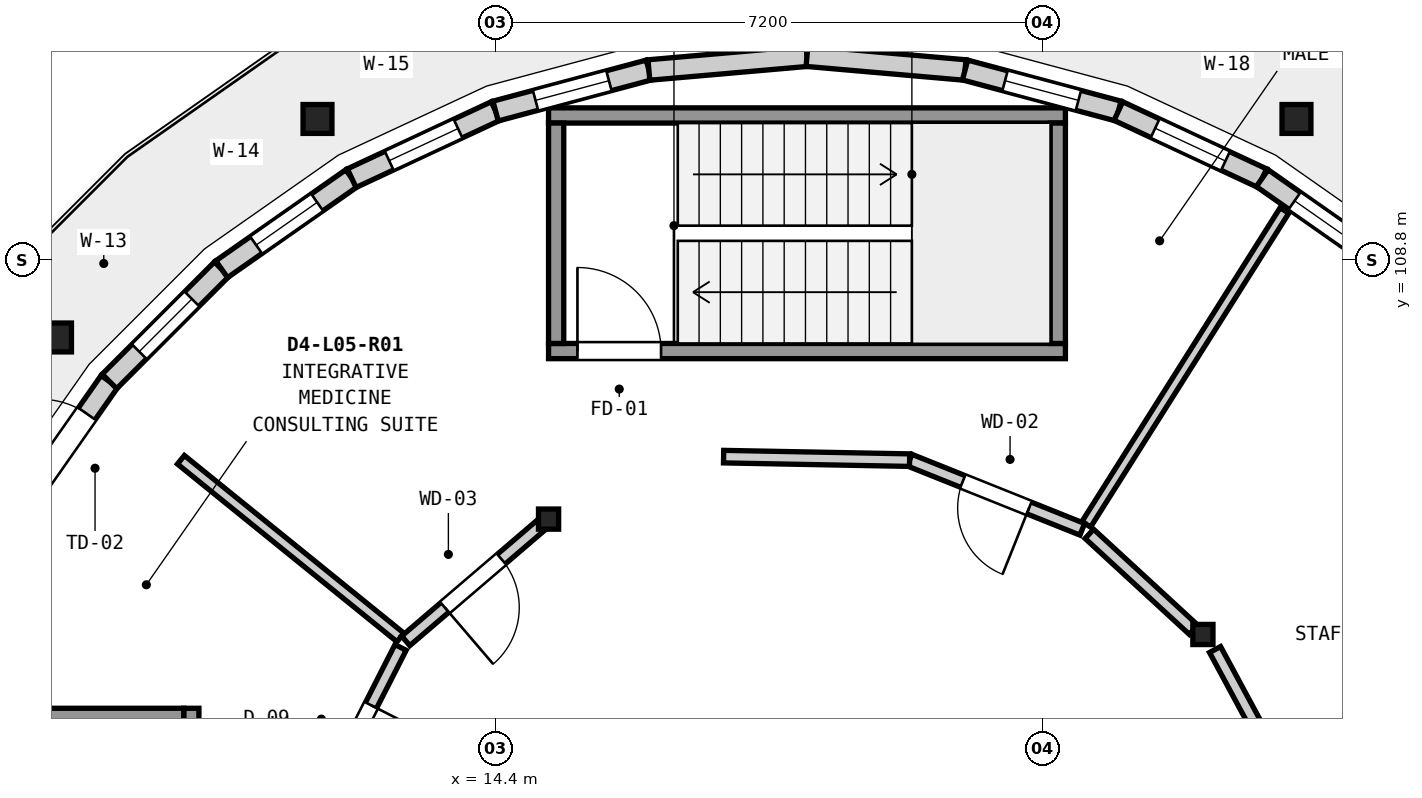
"""IFC4 building model, lengths in metres.
Left out: names, types, materials, properties, quantities, classifications, styles, units other than length and angle.
Written with IfcOpenShell. Run it as: python <this file> out.ifc"""

import sys

from ifc_helpers import new_model, si_unit, direction, frame, frame_2d, origin, origin_2d, place, context, subcontext, project, spatial, rectangle, circle, extrude, element, fill, save


model = new_model("IFC4")
c1 = context("Model", 3, precision=1e-05, world=origin(), true_north=direction((0.0, 1.0)))
c2 = subcontext(c1, "Body", "Model", "MODEL_VIEW")
j1 = project(units=[si_unit("LENGTHUNIT", "METRE"), si_unit("PLANEANGLEUNIT", "RADIAN")], contexts=[c1])
p1 = place(None, origin())
s1 = spatial("IfcSite", under=j1, at=p1, CompositionType="ELEMENT")
p2 = place(p1, origin())
s2 = spatial("IfcBuilding", under=s1, at=p2, CompositionType="ELEMENT")
p3 = place(p2, frame((0.0, 0.0, 21.35)))
s3 = spatial("IfcBuildingStorey", under=s2, at=p3, CompositionType="ELEMENT", Elevation=21.35)
for number, where, z_axis, x_axis in (
    (1, (24.94, 110.654, 0.0), (0.0, 0.0, 1.0), (1.0, 0.0, 0.0)),
    (2, (12.06, 110.654, 0.0), (0.0, 0.0, 1.0), (1.0, 0.0, 0.0)),
    (3, (8.633, 107.779, 0.0), (0.0, 0.0, 1.0), (1.0, 0.0, 0.0)),
):
    element("IfcColumn", number, at=place(p3, frame(where, z_axis=z_axis, x_axis=x_axis)), inside=s3, PredefinedType="PILASTER", context=c2, shape_type="SweptSolid", body=[
        extrude(circle(Radius=0.19, at=origin_2d()), origin(), (0.0, 0.0, 1.0), 4.2),
    ])
for number, where, z_axis, x_axis in (
    (4, (23.709, 103.871, 0.0), (0.0, 0.0, 1.0), (1.0, 0.0, 0.0)),
    (5, (15.1, 105.389, 0.0), (0.0, 0.0, 1.0), (1.0, 0.0, 0.0)),
):
    element("IfcColumn", number, at=place(p3, frame(where, z_axis=z_axis, x_axis=x_axis)), inside=s3, PredefinedType="COLUMN", context=c2, shape_type="SweptSolid", body=[
        extrude(rectangle(XDim=0.265, YDim=0.265, at=origin_2d()), origin(), (0.0, 0.0, 1.0), 4.2),
    ])
p4 = place(p3, frame((8.125, 105.49, 0.0), z_axis=(0.0, 0.0, 1.0), x_axis=(0.573572167388, 0.819155033433, 0.0)))
e6 = element("IfcWall", 6, at=p4, inside=s3, PredefinedType="ELEMENTEDWALL", context=c2, shape_type="SweptSolid", body=[
    extrude(rectangle(XDim=2.089, YDim=0.27, at=frame_2d((1.044, 0.0))), origin(), (0.0, 0.0, 1.0), 3.314),
])
p5 = place(p4, frame((0.519, 0.0, 0.0)))
e7 = element("IfcOpeningElement", 7, at=p5, cuts=e6, PredefinedType="OPENING", context=c2, shape_type="SweptSolid", body=[
    extrude(rectangle(XDim=1.05, YDim=2.15, at=frame_2d((0.525, 1.075))), frame((0.0, 0.145, 0.0), z_axis=(0.0, -1.0, 0.0), x_axis=(1.0, 0.0, 0.0)), (0.0, 0.0, 1.0), 0.29),
])
p6 = place(p3, frame((9.323, 107.201, 0.0), z_axis=(0.0, 0.0, 1.0), x_axis=(0.707106781187, 0.707106781187, 0.0)))
e8 = element("IfcWall", 8, at=p6, inside=s3, PredefinedType="ELEMENTEDWALL", context=c2, shape_type="SweptSolid", body=[
    extrude(rectangle(XDim=2.087, YDim=0.27, at=frame_2d((1.044, 0.0))), origin(), (0.0, 0.0, 1.0), 3.314),
])
p7 = place(p6, frame((0.554, 0.0, 0.85)))
e9 = element("IfcOpeningElement", 9, at=p7, cuts=e8, PredefinedType="OPENING", context=c2, shape_type="SweptSolid", body=[
    extrude(rectangle(XDim=0.98, YDim=1.5, at=frame_2d((0.49, 0.75))), frame((0.0, 0.145, 0.0), z_axis=(0.0, -1.0, 0.0), x_axis=(1.0, 0.0, 0.0)), (0.0, 0.0, 1.0), 0.29),
])
p8 = place(p3, frame((10.799, 108.677, 0.0), z_axis=(0.0, 0.0, 1.0), x_axis=(0.819155033433, 0.573572167388, 0.0)))
e10 = element("IfcWall", 10, at=p8, inside=s3, PredefinedType="ELEMENTEDWALL", context=c2, shape_type="SweptSolid", body=[
    extrude(rectangle(XDim=2.089, YDim=0.27, at=frame_2d((1.044, 0.0))), origin(), (0.0, 0.0, 1.0), 3.314),
])
p9 = place(p8, frame((0.554, 0.0, 0.85)))
e11 = element("IfcOpeningElement", 11, at=p9, cuts=e10, PredefinedType="OPENING", context=c2, shape_type="SweptSolid", body=[
    extrude(rectangle(XDim=0.98, YDim=1.75, at=frame_2d((0.49, 0.875))), frame((0.0, 0.145, 0.0), z_axis=(0.0, -1.0, 0.0), x_axis=(1.0, 0.0, 0.0)), (0.0, 0.0, 1.0), 0.29),
])
p10 = place(p3, frame((12.51, 109.875, 0.0), z_axis=(0.0, 0.0, 1.0), x_axis=(0.906251803004, 0.422738299131, 0.0)))
e12 = element("IfcWall", 12, at=p10, inside=s3, PredefinedType="ELEMENTEDWALL", context=c2, shape_type="SweptSolid", body=[
    extrude(rectangle(XDim=2.089, YDim=0.27, at=frame_2d((1.044, 0.0))), origin(), (0.0, 0.0, 1.0), 3.314),
])
p11 = place(p10, frame((0.544, 0.0, 0.85)))
e13 = element("IfcOpeningElement", 13, at=p11, cuts=e12, PredefinedType="OPENING", context=c2, shape_type="SweptSolid", body=[
    extrude(rectangle(XDim=1.0, YDim=1.45, at=frame_2d((0.5, 0.725))), frame((0.0, 0.145, 0.0), z_axis=(0.0, -1.0, 0.0), x_axis=(1.0, 0.0, 0.0)), (0.0, 0.0, 1.0), 0.29),
])
p12 = place(p3, frame((14.403, 110.758, 0.0), z_axis=(0.0, 0.0, 1.0), x_axis=(0.965970487849, 0.258652308331, 0.0)))
e14 = element("IfcWall", 14, at=p12, inside=s3, PredefinedType="ELEMENTEDWALL", context=c2, shape_type="SweptSolid", body=[
    extrude(rectangle(XDim=2.088, YDim=0.27, at=frame_2d((1.044, 0.0))), origin(), (0.0, 0.0, 1.0), 3.314),
])
p13 = place(p12, frame((0.544, 0.0, 0.85)))
e15 = element("IfcOpeningElement", 15, at=p13, cuts=e14, PredefinedType="OPENING", context=c2, shape_type="SweptSolid", body=[
    extrude(rectangle(XDim=1.0, YDim=1.75, at=frame_2d((0.5, 0.875))), frame((0.0, 0.145, 0.0), z_axis=(0.0, -1.0, 0.0), x_axis=(1.0, 0.0, 0.0)), (0.0, 0.0, 1.0), 0.29),
])
for number, where, z_axis, x_axis in (
    (16, (16.42, 111.298, 0.0), (0.0, 0.0, 1.0), (0.996, 0.087, 0.0)),
    (17, (18.5, 111.48, 0.0), (0.0, 0.0, 1.0), (0.996, -0.087, 0.0)),
):
    element("IfcWall", number, at=place(p3, frame(where, z_axis=z_axis, x_axis=x_axis)), inside=s3, PredefinedType="ELEMENTEDWALL", context=c2, shape_type="SweptSolid", body=[
        extrude(rectangle(XDim=2.088, YDim=0.27, at=frame_2d((1.044, 0.0))), origin(), (0.0, 0.0, 1.0), 3.314),
    ])
p14 = place(p3, frame((20.58, 111.298, 0.0), z_axis=(0.0, 0.0, 1.0), x_axis=(0.965970487849, -0.258652308331, 0.0)))
e18 = element("IfcWall", 18, at=p14, inside=s3, PredefinedType="ELEMENTEDWALL", context=c2, shape_type="SweptSolid", body=[
    extrude(rectangle(XDim=2.088, YDim=0.27, at=frame_2d((1.044, 0.0))), origin(), (0.0, 0.0, 1.0), 3.314),
])
p15 = place(p14, frame((0.544, 0.0, 0.85)))
e19 = element("IfcOpeningElement", 19, at=p15, cuts=e18, PredefinedType="OPENING", context=c2, shape_type="SweptSolid", body=[
    extrude(rectangle(XDim=1.0, YDim=2.0, at=frame_2d((0.5, 1.0))), frame((0.0, 0.145, 0.0), z_axis=(0.0, -1.0, 0.0), x_axis=(1.0, 0.0, 0.0)), (0.0, 0.0, 1.0), 0.29),
])
p16 = place(p3, frame((22.597, 110.758, 0.0), z_axis=(0.0, 0.0, 1.0), x_axis=(0.906251803004, -0.422738299131, 0.0)))
e20 = element("IfcWall", 20, at=p16, inside=s3, PredefinedType="ELEMENTEDWALL", context=c2, shape_type="SweptSolid", body=[
    extrude(rectangle(XDim=2.089, YDim=0.27, at=frame_2d((1.044, 0.0))), origin(), (0.0, 0.0, 1.0), 3.314),
])
p17 = place(p16, frame((0.534, 0.0, 0.85)))
e21 = element("IfcOpeningElement", 21, at=p17, cuts=e20, PredefinedType="OPENING", context=c2, shape_type="SweptSolid", body=[
    extrude(rectangle(XDim=1.02, YDim=1.6, at=frame_2d((0.51, 0.8))), frame((0.0, 0.145, 0.0), z_axis=(0.0, -1.0, 0.0), x_axis=(1.0, 0.0, 0.0)), (0.0, 0.0, 1.0), 0.29),
])
p18 = place(p3, frame((24.49, 109.875, 0.0), z_axis=(0.0, 0.0, 1.0), x_axis=(0.819155033433, -0.573572167388, 0.0)))
e22 = element("IfcWall", 22, at=p18, inside=s3, PredefinedType="ELEMENTEDWALL", context=c2, shape_type="SweptSolid", body=[
    extrude(rectangle(XDim=2.089, YDim=0.27, at=frame_2d((1.044, 0.0))), origin(), (0.0, 0.0, 1.0), 3.314),
])
p19 = place(p18, frame((0.519, 0.0, 0.85)))
e23 = element("IfcOpeningElement", 23, at=p19, cuts=e22, PredefinedType="OPENING", context=c2, shape_type="SweptSolid", body=[
    extrude(rectangle(XDim=1.05, YDim=1.35, at=frame_2d((0.525, 0.675))), frame((0.0, 0.145, 0.0), z_axis=(0.0, -1.0, 0.0), x_axis=(1.0, 0.0, 0.0)), (0.0, 0.0, 1.0), 0.29),
])
p20 = place(p3, frame((15.1, 107.6, 0.0), z_axis=(0.0, 0.0, 1.0), x_axis=(1.0, 0.0, 0.0)))
e24 = element("IfcWall", 24, at=p20, inside=s3, PredefinedType="SHEAR", context=c2, shape_type="SweptSolid", body=[
    extrude(rectangle(XDim=6.8, YDim=0.2, at=frame_2d((3.4, 0.0))), origin(), (0.0, 0.0, 1.0), 3.96),
])
p21 = place(p20, frame((0.38, 0.0, 0.0)))
e25 = element("IfcOpeningElement", 25, at=p21, cuts=e24, PredefinedType="OPENING", context=c2, shape_type="SweptSolid", body=[
    extrude(rectangle(XDim=1.1, YDim=2.15, at=frame_2d((0.55, 1.075))), frame((0.0, 0.11, 0.0), z_axis=(0.0, -1.0, 0.0), x_axis=(1.0, 0.0, 0.0)), (0.0, 0.0, 1.0), 0.22),
])
p22 = place(p3, frame((15.1, 110.7, 0.0), z_axis=(0.0, 0.0, 1.0), x_axis=(1.0, 0.0, 0.0)))
e26 = element("IfcWall", 26, at=p22, inside=s3, PredefinedType="SHEAR", context=c2, shape_type="SweptSolid", body=[
    extrude(rectangle(XDim=6.8, YDim=0.2, at=frame_2d((3.4, 0.0))), origin(), (0.0, 0.0, 1.0), 3.96),
])
for number, where, z_axis, x_axis in (
    (27, (15.2, 107.7, 0.0), (0.0, 0.0, 1.0), (0.0, 1.0, 0.0)),
    (28, (21.8, 107.7, 0.0), (0.0, 0.0, 1.0), (0.0, 1.0, 0.0)),
):
    element("IfcWall", number, at=place(p3, frame(where, z_axis=z_axis, x_axis=x_axis)), inside=s3, PredefinedType="SHEAR", context=c2, shape_type="SweptSolid", body=[
        extrude(rectangle(XDim=2.9, YDim=0.2, at=frame_2d((1.45, 0.0))), origin(), (0.0, 0.0, 1.0), 3.96),
    ])
p23 = place(p3, frame((10.4, 96.1, 0.0), z_axis=(0.0, 0.0, 1.0), x_axis=(0.0, 1.0, 0.0)))
e29 = element("IfcWall", 29, at=p23, inside=s3, PredefinedType="SHEAR", context=c2, shape_type="SweptSolid", body=[
    extrude(rectangle(XDim=6.8, YDim=0.2, at=frame_2d((3.4, 0.0))), origin(), (0.0, 0.0, 1.0), 3.96),
])
p24 = place(p23, frame((0.38, 0.0, 0.0)))
e30 = element("IfcOpeningElement", 30, at=p24, cuts=e29, PredefinedType="OPENING", context=c2, shape_type="SweptSolid", body=[
    extrude(rectangle(XDim=1.1, YDim=2.15, at=frame_2d((0.55, 1.075))), frame((0.0, 0.11, 0.0), z_axis=(0.0, -1.0, 0.0), x_axis=(1.0, 0.0, 0.0)), (0.0, 0.0, 1.0), 0.22),
])
p25 = place(p3, frame((10.3, 102.8, 0.0), z_axis=(0.0, 0.0, 1.0), x_axis=(-1.0, 0.0, 0.0)))
e31 = element("IfcWall", 31, at=p25, inside=s3, PredefinedType="SHEAR", context=c2, shape_type="SweptSolid", body=[
    extrude(rectangle(XDim=2.9, YDim=0.2, at=frame_2d((1.45, 0.0))), origin(), (0.0, 0.0, 1.0), 3.96),
])
p26 = place(p3, frame((13.151, 103.832, 0.0), z_axis=(0.0, 0.0, 1.0), x_axis=(-0.777240280244, 0.629203899198, 0.0)))
e32 = element("IfcWall", 32, at=p26, inside=s3, PredefinedType="PARTITIONING", context=c2, shape_type="SweptSolid", body=[
    extrude(rectangle(XDim=3.716, YDim=0.145, at=frame_2d((1.858, 0.0))), origin(), (0.0, 0.0, 1.0), 3.279),
])
p27 = place(p3, frame((22.174, 105.32, 0.0), z_axis=(0.0, 0.0, 1.0), x_axis=(0.533929049937, 0.845529283723, 0.0)))
e33 = element("IfcWall", 33, at=p27, inside=s3, PredefinedType="PLUMBINGWALL", context=c2, shape_type="SweptSolid", body=[
    extrude(rectangle(XDim=4.884, YDim=0.135, at=frame_2d((2.442, 0.0))), origin(), (0.0, 0.0, 1.0), 3.279),
])
p28 = place(p3, frame((13.153, 103.701, 0.0), z_axis=(0.0, 0.0, 1.0), x_axis=(-0.454070411611, -0.890965802542, 0.0)))
e34 = element("IfcWall", 34, at=p28, inside=s3, PredefinedType="PARTITIONING", context=c2, shape_type="SweptSolid", body=[
    extrude(rectangle(XDim=2.63, YDim=0.165, at=frame_2d((1.315, 0.0))), origin(), (0.0, 0.0, 1.0), 3.279),
])
p29 = place(p28, frame((0.854, 0.0, 0.0)))
e35 = element("IfcOpeningElement", 35, at=p29, cuts=e34, PredefinedType="OPENING", context=c2, shape_type="SweptSolid", body=[
    extrude(rectangle(XDim=0.92, YDim=2.24, at=frame_2d((0.46, 1.12))), frame((0.0, 0.093, 0.0), z_axis=(0.0, -1.0, 0.0), x_axis=(1.0, 0.0, 0.0)), (0.0, 0.0, 1.0), 0.185),
])
p30 = place(p3, frame((24.936, 101.695, 0.0), z_axis=(0.0, 0.0, 1.0), x_axis=(-0.474805741817, 0.880090624617, 0.0)))
e36 = element("IfcWall", 36, at=p30, inside=s3, PredefinedType="PARTITIONING", context=c2, shape_type="SweptSolid", body=[
    extrude(rectangle(XDim=2.248, YDim=0.165, at=frame_2d((1.124, 0.0))), origin(), (0.0, 0.0, 1.0), 3.279),
])
p31 = place(p3, frame((23.586, 103.933, 0.0), z_axis=(0.0, 0.0, 1.0), x_axis=(-0.735722058644, 0.67728358346, 0.0)))
e37 = element("IfcWall", 37, at=p31, inside=s3, PredefinedType="PARTITIONING", context=c2, shape_type="SweptSolid", body=[
    extrude(rectangle(XDim=1.863, YDim=0.165, at=frame_2d((0.932, 0.0))), origin(), (0.0, 0.0, 1.0), 3.279),
])
p32 = place(p3, frame((22.122, 105.255, 0.0), z_axis=(0.0, 0.0, 1.0), x_axis=(-0.928283943148, 0.371872183544, 0.0)))
e38 = element("IfcWall", 38, at=p32, inside=s3, PredefinedType="PARTITIONING", context=c2, shape_type="SweptSolid", body=[
    extrude(rectangle(XDim=2.448, YDim=0.165, at=frame_2d((1.224, 0.0))), origin(), (0.0, 0.0, 1.0), 3.279),
])
p33 = place(p32, frame((0.754, 0.0, 0.0)))
e39 = element("IfcOpeningElement", 39, at=p33, cuts=e38, PredefinedType="OPENING", context=c2, shape_type="SweptSolid", body=[
    extrude(rectangle(XDim=0.94, YDim=2.1, at=frame_2d((0.47, 1.05))), frame((0.0, 0.093, 0.0), z_axis=(0.0, -1.0, 0.0), x_axis=(1.0, 0.0, 0.0)), (0.0, 0.0, 1.0), 0.185),
])
p34 = place(p3, frame((19.85, 106.165, 0.0), z_axis=(0.0, 0.0, 1.0), x_axis=(-0.999824136519, 0.018753560577, 0.0)))
e40 = element("IfcWall", 40, at=p34, inside=s3, PredefinedType="PARTITIONING", context=c2, shape_type="SweptSolid", body=[
    extrude(rectangle(XDim=2.448, YDim=0.165, at=frame_2d((1.224, 0.0))), origin(), (0.0, 0.0, 1.0), 3.279),
])
p35 = place(p3, frame((14.993, 105.303, 0.0), z_axis=(0.0, 0.0, 1.0), x_axis=(-0.759884425371, -0.650058197455, 0.0)))
e41 = element("IfcWall", 41, at=p35, inside=s3, PredefinedType="PARTITIONING", context=c2, shape_type="SweptSolid", body=[
    extrude(rectangle(XDim=2.332, YDim=0.165, at=frame_2d((1.166, 0.0))), origin(), (0.0, 0.0, 1.0), 3.279),
])
p36 = place(p35, frame((0.676, 0.0, 0.0)))
e42 = element("IfcOpeningElement", 42, at=p36, cuts=e41, PredefinedType="OPENING", context=c2, shape_type="SweptSolid", body=[
    extrude(rectangle(XDim=0.98, YDim=2.1, at=frame_2d((0.49, 1.05))), frame((0.0, 0.093, 0.0), z_axis=(0.0, -1.0, 0.0), x_axis=(1.0, 0.0, 0.0)), (0.0, 0.0, 1.0), 0.185),
])
p37 = place(p5, origin())
e43 = element("IfcDoor", 43, at=p37, inside=s3, OperationType="SINGLE_SWING_LEFT", PredefinedType="DOOR", context=c2, shape_type="SweptSolid", body=[
    extrude(rectangle(XDim=1.05, YDim=2.15, at=frame_2d((0.525, 1.075))), frame((0.0, 0.025, 0.0), z_axis=(0.0, -1.0, 0.0), x_axis=(1.0, 0.0, 0.0)), (0.0, 0.0, 1.0), 0.05),
])
fill(e7, e43)
p38 = place(p7, origin())
e44 = element("IfcWindow", 44, at=p38, inside=s3, PartitioningType="SINGLE_PANEL", PredefinedType="WINDOW", context=c2, shape_type="SweptSolid", body=[
    extrude(rectangle(XDim=0.98, YDim=1.5, at=frame_2d((0.49, 0.75))), frame((0.0, 0.03, 0.0), z_axis=(0.0, -1.0, 0.0), x_axis=(1.0, 0.0, 0.0)), (0.0, 0.0, 1.0), 0.06),
])
fill(e9, e44)
p39 = place(p9, origin())
e45 = element("IfcWindow", 45, at=p39, inside=s3, PartitioningType="SINGLE_PANEL", PredefinedType="WINDOW", context=c2, shape_type="SweptSolid", body=[
    extrude(rectangle(XDim=0.98, YDim=1.75, at=frame_2d((0.49, 0.875))), frame((0.0, 0.03, 0.0), z_axis=(0.0, -1.0, 0.0), x_axis=(1.0, 0.0, 0.0)), (0.0, 0.0, 1.0), 0.06),
])
fill(e11, e45)
p40 = place(p11, origin())
e46 = element("IfcWindow", 46, at=p40, inside=s3, PartitioningType="SINGLE_PANEL", PredefinedType="WINDOW", context=c2, shape_type="SweptSolid", body=[
    extrude(rectangle(XDim=1.0, YDim=1.45, at=frame_2d((0.5, 0.725))), frame((0.0, 0.03, 0.0), z_axis=(0.0, -1.0, 0.0), x_axis=(1.0, 0.0, 0.0)), (0.0, 0.0, 1.0), 0.06),
])
fill(e13, e46)
p41 = place(p13, origin())
e47 = element("IfcWindow", 47, at=p41, inside=s3, PartitioningType="SINGLE_PANEL", PredefinedType="WINDOW", context=c2, shape_type="SweptSolid", body=[
    extrude(rectangle(XDim=1.0, YDim=1.75, at=frame_2d((0.5, 0.875))), frame((0.0, 0.03, 0.0), z_axis=(0.0, -1.0, 0.0), x_axis=(1.0, 0.0, 0.0)), (0.0, 0.0, 1.0), 0.06),
])
fill(e15, e47)
p42 = place(p15, origin())
e48 = element("IfcWindow", 48, at=p42, inside=s3, PartitioningType="SINGLE_PANEL", PredefinedType="WINDOW", context=c2, shape_type="SweptSolid", body=[
    extrude(rectangle(XDim=1.0, YDim=2.0, at=frame_2d((0.5, 1.0))), frame((0.0, 0.03, 0.0), z_axis=(0.0, -1.0, 0.0), x_axis=(1.0, 0.0, 0.0)), (0.0, 0.0, 1.0), 0.06),
])
fill(e19, e48)
p43 = place(p17, origin())
e49 = element("IfcWindow", 49, at=p43, inside=s3, PartitioningType="SINGLE_PANEL", PredefinedType="WINDOW", context=c2, shape_type="SweptSolid", body=[
    extrude(rectangle(XDim=1.02, YDim=1.6, at=frame_2d((0.51, 0.8))), frame((0.0, 0.03, 0.0), z_axis=(0.0, -1.0, 0.0), x_axis=(1.0, 0.0, 0.0)), (0.0, 0.0, 1.0), 0.06),
])
fill(e21, e49)
p44 = place(p19, origin())
e50 = element("IfcWindow", 50, at=p44, inside=s3, PartitioningType="SINGLE_PANEL", PredefinedType="WINDOW", context=c2, shape_type="SweptSolid", body=[
    extrude(rectangle(XDim=1.05, YDim=1.35, at=frame_2d((0.525, 0.675))), frame((0.0, 0.03, 0.0), z_axis=(0.0, -1.0, 0.0), x_axis=(1.0, 0.0, 0.0)), (0.0, 0.0, 1.0), 0.06),
])
fill(e23, e50)
p45 = place(p21, origin())
e51 = element("IfcDoor", 51, at=p45, inside=s3, OperationType="SINGLE_SWING_LEFT", PredefinedType="DOOR", context=c2, shape_type="SweptSolid", body=[
    extrude(rectangle(XDim=1.1, YDim=2.15, at=frame_2d((0.55, 1.075))), frame((0.0, 0.025, 0.0), z_axis=(0.0, -1.0, 0.0), x_axis=(1.0, 0.0, 0.0)), (0.0, 0.0, 1.0), 0.05),
])
fill(e25, e51)
p46 = place(p29, origin())
e52 = element("IfcDoor", 52, at=p46, inside=s3, OperationType="SINGLE_SWING_LEFT", PredefinedType="DOOR", context=c2, shape_type="SweptSolid", body=[
    extrude(rectangle(XDim=0.92, YDim=2.24, at=frame_2d((0.46, 1.12))), frame((0.0, 0.025, 0.0), z_axis=(0.0, -1.0, 0.0), x_axis=(1.0, 0.0, 0.0)), (0.0, 0.0, 1.0), 0.05),
])
fill(e35, e52)
p47 = place(p33, origin())
e53 = element("IfcDoor", 53, at=p47, inside=s3, OperationType="SINGLE_SWING_LEFT", PredefinedType="DOOR", context=c2, shape_type="SweptSolid", body=[
    extrude(rectangle(XDim=0.94, YDim=2.1, at=frame_2d((0.47, 1.05))), frame((0.0, 0.025, 0.0), z_axis=(0.0, -1.0, 0.0), x_axis=(1.0, 0.0, 0.0)), (0.0, 0.0, 1.0), 0.05),
])
fill(e39, e53)
p48 = place(p36, origin())
e54 = element("IfcDoor", 54, at=p48, inside=s3, OperationType="SINGLE_SWING_RIGHT", PredefinedType="DOOR", context=c2, shape_type="SweptSolid", body=[
    extrude(rectangle(XDim=0.98, YDim=2.1, at=frame_2d((0.49, 1.05))), frame((0.0, 0.025, 0.0), z_axis=(0.0, -1.0, 0.0), x_axis=(1.0, 0.0, 0.0)), (0.0, 0.0, 1.0), 0.05),
])
fill(e42, e54)
save(model, sys.argv[1])
